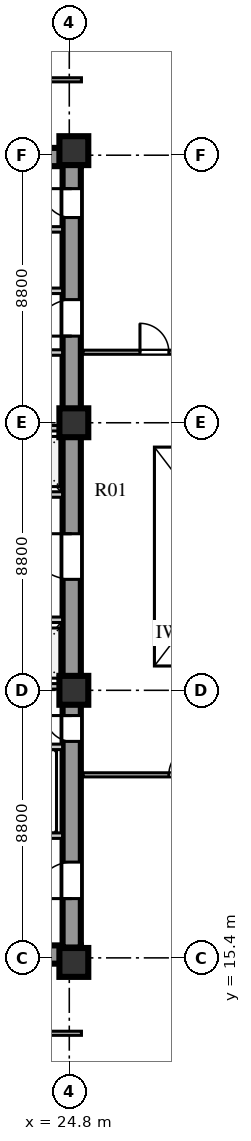
"""IFC4 building model, lengths in metres.
Left out: names, types, materials, properties, quantities, classifications, styles, units other than length and angle.
Written with IfcOpenShell. Run it as: python <this file> out.ifc"""

import sys

from ifc_helpers import new_model, si_unit, direction, frame, frame_2d, origin, origin_2d, place, context, subcontext, project, spatial, rectangle, extrude, element, fill, save


model = new_model("IFC4")
c1 = context("Model", 3, precision=1e-05, world=origin(), true_north=direction((0.0, 1.0)))
c2 = subcontext(c1, "Body", "Model", "MODEL_VIEW")
j1 = project(units=[si_unit("LENGTHUNIT", "METRE"), si_unit("PLANEANGLEUNIT", "RADIAN")], contexts=[c1])
p1 = place(None, origin())
s1 = spatial("IfcSite", under=j1, at=p1, CompositionType="ELEMENT")
p2 = place(p1, origin())
s2 = spatial("IfcBuilding", under=s1, at=p2, CompositionType="ELEMENT")
p3 = place(p2, frame((0.0, 0.0, 42.0)))
s3 = spatial("IfcBuildingStorey", under=s2, at=p3, CompositionType="ELEMENT", Elevation=42.0)
for number, where, z_axis, x_axis in (
    (1, (15.3, 15.51, 0.0), (0.0, 0.0, 1.0), (1.0, 0.0, 0.0)),
    (2, (15.3, 41.74, 0.0), (0.0, 0.0, 1.0), (1.0, 0.0, 0.0)),
):
    element("IfcWall", number, at=place(p3, frame(where, z_axis=z_axis, x_axis=x_axis)), inside=s3, PredefinedType="SHEAR", context=c2, shape_type="SweptSolid", body=[
        extrude(rectangle(XDim=9.88, YDim=0.6, at=frame_2d((4.94, 0.0))), origin(), (0.0, 0.0, 1.0), 3.72),
    ])
p4 = place(p3, frame((24.88, 15.74, 0.0), z_axis=(0.0, 0.0, 1.0), x_axis=(0.0, 1.0, 0.0)))
e3 = element("IfcWall", 3, at=p4, inside=s3, PredefinedType="SHEAR", context=c2, shape_type="SweptSolid", body=[
    extrude(rectangle(XDim=25.76, YDim=0.6, at=frame_2d((12.88, 0.0))), origin(), (0.0, 0.0, 1.0), 3.72),
])
p5 = place(p4, frame((1.61, 0.0, 0.0)))
e4 = element("IfcOpeningElement", 4, at=p5, cuts=e3, PredefinedType="OPENING", context=c2, shape_type="SweptSolid", body=[
    extrude(rectangle(XDim=1.2, YDim=2.1, at=frame_2d((0.6, 1.05))), frame((0.0, 0.31, 0.0), z_axis=(0.0, -1.0, 0.0), x_axis=(1.0, 0.0, 0.0)), (0.0, 0.0, 1.0), 0.62),
])
p6 = place(p4, frame((6.78, 0.0, 0.0)))
e5 = element("IfcOpeningElement", 5, at=p6, cuts=e3, PredefinedType="OPENING", context=c2, shape_type="SweptSolid", body=[
    extrude(rectangle(XDim=0.85, YDim=2.06, at=frame_2d((0.425, 1.03))), frame((0.0, 0.31, 0.0), z_axis=(0.0, -1.0, 0.0), x_axis=(1.0, 0.0, 0.0)), (0.0, 0.0, 1.0), 0.62),
])
p7 = place(p4, frame((12.11, 0.0, 0.0)))
e6 = element("IfcOpeningElement", 6, at=p7, cuts=e3, PredefinedType="OPENING", context=c2, shape_type="SweptSolid", body=[
    extrude(rectangle(XDim=1.5, YDim=2.12, at=frame_2d((0.75, 1.06))), frame((0.0, 0.31, 0.0), z_axis=(0.0, -1.0, 0.0), x_axis=(1.0, 0.0, 0.0)), (0.0, 0.0, 1.0), 0.62),
])
p8 = place(p4, frame((20.11, 0.0, 0.0)))
e7 = element("IfcOpeningElement", 7, at=p8, cuts=e3, PredefinedType="OPENING", context=c2, shape_type="SweptSolid", body=[
    extrude(rectangle(XDim=1.2, YDim=2.12, at=frame_2d((0.6, 1.06))), frame((0.0, 0.31, 0.0), z_axis=(0.0, -1.0, 0.0), x_axis=(1.0, 0.0, 0.0)), (0.0, 0.0, 1.0), 0.62),
])
p9 = place(p4, frame((24.01, 0.0, 0.0)))
e8 = element("IfcOpeningElement", 8, at=p9, cuts=e3, PredefinedType="OPENING", context=c2, shape_type="SweptSolid", body=[
    extrude(rectangle(XDim=0.95, YDim=2.1, at=frame_2d((0.475, 1.05))), frame((0.0, 0.31, 0.0), z_axis=(0.0, -1.0, 0.0), x_axis=(1.0, 0.0, 0.0)), (0.0, 0.0, 1.0), 0.62),
])
for number, where, z_axis, x_axis in (
    (9, (24.95, 15.25, 0.0), (0.0, 0.0, 1.0), (1.0, 0.0, 0.0)),
    (10, (24.95, 24.2, 0.0), (0.0, 0.0, 1.0), (1.0, 0.0, 0.0)),
    (11, (24.95, 33.0, 0.0), (0.0, 0.0, 1.0), (1.0, 0.0, 0.0)),
    (12, (24.95, 41.95, 0.0), (0.0, 0.0, 1.0), (1.0, 0.0, 0.0)),
):
    element("IfcColumn", number, at=place(p3, frame(where, z_axis=z_axis, x_axis=x_axis)), inside=s3, PredefinedType="COLUMN", context=c2, shape_type="SweptSolid", body=[
        extrude(rectangle(XDim=0.95, YDim=0.95, at=origin_2d()), origin(), (0.0, 0.0, 1.0), 3.72),
    ])
p10 = place(p3, frame((19.64, 19.42, 0.0), z_axis=(0.0, 0.0, 1.0), x_axis=(1.0, 0.0, 0.0)))
e13 = element("IfcWall", 13, at=p10, inside=s3, PredefinedType="SOLIDWALL", context=c2, shape_type="SweptSolid", body=[
    extrude(rectangle(XDim=4.94, YDim=0.18, at=frame_2d((2.47, 0.0))), origin(), (0.0, 0.0, 1.0), 3.72),
])
p11 = place(p10, frame((0.72, 0.0, 0.0)))
e14 = element("IfcOpeningElement", 14, at=p11, cuts=e13, PredefinedType="OPENING", context=c2, shape_type="SweptSolid", body=[
    extrude(rectangle(XDim=1.1, YDim=2.1, at=frame_2d((0.55, 1.05))), frame((0.0, 0.1, 0.0), z_axis=(0.0, -1.0, 0.0), x_axis=(1.0, 0.0, 0.0)), (0.0, 0.0, 1.0), 0.2),
])
p12 = place(p10, frame((3.02, 0.0, 0.0)))
e15 = element("IfcOpeningElement", 15, at=p12, cuts=e13, PredefinedType="OPENING", context=c2, shape_type="SweptSolid", body=[
    extrude(rectangle(XDim=1.1, YDim=2.1, at=frame_2d((0.55, 1.05))), frame((0.0, 0.1, 0.0), z_axis=(0.0, -1.0, 0.0), x_axis=(1.0, 0.0, 0.0)), (0.0, 0.0, 1.0), 0.2),
])
p13 = place(p3, frame((19.64, 22.34, 0.0), z_axis=(0.0, 0.0, 1.0), x_axis=(1.0, 0.0, 0.0)))
e16 = element("IfcWall", 16, at=p13, inside=s3, PredefinedType="SOLIDWALL", context=c2, shape_type="SweptSolid", body=[
    extrude(rectangle(XDim=4.94, YDim=0.18, at=frame_2d((2.47, 0.0))), origin(), (0.0, 0.0, 1.0), 3.72),
])
p14 = place(p3, frame((15.9, 26.52, 0.0), z_axis=(0.0, 0.0, 1.0), x_axis=(1.0, 0.0, 0.0)))
e17 = element("IfcWall", 17, at=p14, inside=s3, PredefinedType="SOLIDWALL", context=c2, shape_type="SweptSolid", body=[
    extrude(rectangle(XDim=8.68, YDim=0.18, at=frame_2d((4.34, 0.0))), origin(), (0.0, 0.0, 1.0), 3.72),
])
p15 = place(p14, frame((1.76, 0.0, 0.0)))
e18 = element("IfcOpeningElement", 18, at=p15, cuts=e17, PredefinedType="OPENING", context=c2, shape_type="SweptSolid", body=[
    extrude(rectangle(XDim=1.0, YDim=2.1, at=frame_2d((0.5, 1.05))), frame((0.0, 0.1, 0.0), z_axis=(0.0, -1.0, 0.0), x_axis=(1.0, 0.0, 0.0)), (0.0, 0.0, 1.0), 0.2),
])
p16 = place(p14, frame((3.6, 0.0, 0.0)))
e19 = element("IfcOpeningElement", 19, at=p16, cuts=e17, PredefinedType="OPENING", context=c2, shape_type="SweptSolid", body=[
    extrude(rectangle(XDim=1.0, YDim=2.1, at=frame_2d((0.5, 1.05))), frame((0.0, 0.1, 0.0), z_axis=(0.0, -1.0, 0.0), x_axis=(1.0, 0.0, 0.0)), (0.0, 0.0, 1.0), 0.2),
])
p17 = place(p14, frame((5.44, 0.0, 0.0)))
e20 = element("IfcOpeningElement", 20, at=p17, cuts=e17, PredefinedType="OPENING", context=c2, shape_type="SweptSolid", body=[
    extrude(rectangle(XDim=1.0, YDim=2.1, at=frame_2d((0.5, 1.05))), frame((0.0, 0.1, 0.0), z_axis=(0.0, -1.0, 0.0), x_axis=(1.0, 0.0, 0.0)), (0.0, 0.0, 1.0), 0.2),
])
p18 = place(p14, frame((7.28, 0.0, 0.0)))
e21 = element("IfcOpeningElement", 21, at=p18, cuts=e17, PredefinedType="OPENING", context=c2, shape_type="SweptSolid", body=[
    extrude(rectangle(XDim=1.0, YDim=2.1, at=frame_2d((0.5, 1.05))), frame((0.0, 0.1, 0.0), z_axis=(0.0, -1.0, 0.0), x_axis=(1.0, 0.0, 0.0)), (0.0, 0.0, 1.0), 0.2),
])
p19 = place(p3, frame((15.9, 24.33, 0.0), z_axis=(0.0, 0.0, 1.0), x_axis=(1.0, 0.0, 0.0)))
e22 = element("IfcWall", 22, at=p19, inside=s3, PredefinedType="SOLIDWALL", context=c2, shape_type="SweptSolid", body=[
    extrude(rectangle(XDim=8.68, YDim=0.18, at=frame_2d((4.34, 0.0))), origin(), (0.0, 0.0, 1.0), 3.02),
])
p20 = place(p3, frame((15.9, 30.64, 0.0), z_axis=(0.0, 0.0, 1.0), x_axis=(1.0, 0.0, 0.0)))
e23 = element("IfcWall", 23, at=p20, inside=s3, PredefinedType="SOLIDWALL", context=c2, shape_type="SweptSolid", body=[
    extrude(rectangle(XDim=8.68, YDim=0.18, at=frame_2d((4.34, 0.0))), origin(), (0.0, 0.0, 1.0), 3.72),
])
p21 = place(p20, frame((1.76, 0.0, 0.0)))
e24 = element("IfcOpeningElement", 24, at=p21, cuts=e23, PredefinedType="OPENING", context=c2, shape_type="SweptSolid", body=[
    extrude(rectangle(XDim=1.0, YDim=2.1, at=frame_2d((0.5, 1.05))), frame((0.0, 0.1, 0.0), z_axis=(0.0, -1.0, 0.0), x_axis=(1.0, 0.0, 0.0)), (0.0, 0.0, 1.0), 0.2),
])
p22 = place(p20, frame((3.6, 0.0, 0.0)))
e25 = element("IfcOpeningElement", 25, at=p22, cuts=e23, PredefinedType="OPENING", context=c2, shape_type="SweptSolid", body=[
    extrude(rectangle(XDim=1.0, YDim=2.1, at=frame_2d((0.5, 1.05))), frame((0.0, 0.1, 0.0), z_axis=(0.0, -1.0, 0.0), x_axis=(1.0, 0.0, 0.0)), (0.0, 0.0, 1.0), 0.2),
])
p23 = place(p20, frame((5.44, 0.0, 0.0)))
e26 = element("IfcOpeningElement", 26, at=p23, cuts=e23, PredefinedType="OPENING", context=c2, shape_type="SweptSolid", body=[
    extrude(rectangle(XDim=1.0, YDim=2.1, at=frame_2d((0.5, 1.05))), frame((0.0, 0.1, 0.0), z_axis=(0.0, -1.0, 0.0), x_axis=(1.0, 0.0, 0.0)), (0.0, 0.0, 1.0), 0.2),
])
p24 = place(p20, frame((7.28, 0.0, 0.0)))
e27 = element("IfcOpeningElement", 27, at=p24, cuts=e23, PredefinedType="OPENING", context=c2, shape_type="SweptSolid", body=[
    extrude(rectangle(XDim=1.0, YDim=2.1, at=frame_2d((0.5, 1.05))), frame((0.0, 0.1, 0.0), z_axis=(0.0, -1.0, 0.0), x_axis=(1.0, 0.0, 0.0)), (0.0, 0.0, 1.0), 0.2),
])
p25 = place(p3, frame((15.9, 32.82, 0.0), z_axis=(0.0, 0.0, 1.0), x_axis=(1.0, 0.0, 0.0)))
e28 = element("IfcWall", 28, at=p25, inside=s3, PredefinedType="SOLIDWALL", context=c2, shape_type="SweptSolid", body=[
    extrude(rectangle(XDim=8.68, YDim=0.18, at=frame_2d((4.34, 0.0))), origin(), (0.0, 0.0, 1.0), 3.02),
])
p26 = place(p3, frame((22.02, 35.31, 0.0), z_axis=(0.0, 0.0, 1.0), x_axis=(1.0, 0.0, 0.0)))
e29 = element("IfcWall", 29, at=p26, inside=s3, PredefinedType="SOLIDWALL", context=c2, shape_type="SweptSolid", body=[
    extrude(rectangle(XDim=2.56, YDim=0.18, at=frame_2d((1.28, 0.0))), origin(), (0.0, 0.0, 1.0), 3.72),
])
p27 = place(p26, frame((0.55, 0.0, 0.0)))
e30 = element("IfcOpeningElement", 30, at=p27, cuts=e29, PredefinedType="OPENING", context=c2, shape_type="SweptSolid", body=[
    extrude(rectangle(XDim=1.0, YDim=2.1, at=frame_2d((0.5, 1.05))), frame((0.0, 0.1, 0.0), z_axis=(0.0, -1.0, 0.0), x_axis=(1.0, 0.0, 0.0)), (0.0, 0.0, 1.0), 0.2),
])
p28 = place(p3, frame((19.64, 37.34, 0.0), z_axis=(0.0, 0.0, 1.0), x_axis=(1.0, 0.0, 0.0)))
e31 = element("IfcWall", 31, at=p28, inside=s3, PredefinedType="SOLIDWALL", context=c2, shape_type="SweptSolid", body=[
    extrude(rectangle(XDim=4.94, YDim=0.18, at=frame_2d((2.47, 0.0))), origin(), (0.0, 0.0, 1.0), 3.72),
])
p29 = place(p28, frame((0.45, 0.0, 0.0)))
e32 = element("IfcOpeningElement", 32, at=p29, cuts=e31, PredefinedType="OPENING", context=c2, shape_type="SweptSolid", body=[
    extrude(rectangle(XDim=1.0, YDim=2.1, at=frame_2d((0.5, 1.05))), frame((0.0, 0.1, 0.0), z_axis=(0.0, -1.0, 0.0), x_axis=(1.0, 0.0, 0.0)), (0.0, 0.0, 1.0), 0.2),
])
p30 = place(p28, frame((2.5, 0.0, 0.0)))
e33 = element("IfcOpeningElement", 33, at=p30, cuts=e31, PredefinedType="OPENING", context=c2, shape_type="SweptSolid", body=[
    extrude(rectangle(XDim=1.0, YDim=2.1, at=frame_2d((0.5, 1.05))), frame((0.0, 0.1, 0.0), z_axis=(0.0, -1.0, 0.0), x_axis=(1.0, 0.0, 0.0)), (0.0, 0.0, 1.0), 0.2),
])
p31 = place(p3, frame((19.64, 39.36, 0.0), z_axis=(0.0, 0.0, 1.0), x_axis=(1.0, 0.0, 0.0)))
e34 = element("IfcWall", 34, at=p31, inside=s3, PredefinedType="SOLIDWALL", context=c2, shape_type="SweptSolid", body=[
    extrude(rectangle(XDim=4.94, YDim=0.18, at=frame_2d((2.47, 0.0))), origin(), (0.0, 0.0, 1.0), 3.72),
])
p32 = place(p3, frame((25.25, 21.42, 0.0), z_axis=(0.0, 0.0, 1.0), x_axis=(1.0, 0.0, 0.0)))
e35 = element("IfcWall", 35, at=p32, inside=s3, PredefinedType="PARTITIONING", context=c2, shape_type="SweptSolid", body=[
    extrude(rectangle(XDim=12.87, YDim=0.135, at=frame_2d((6.435, 0.0))), origin(), (0.0, 0.0, 1.0), 3.32),
])
p33 = place(p32, frame((2.825, 0.0, 0.0)))
e36 = element("IfcOpeningElement", 36, at=p33, cuts=e35, PredefinedType="OPENING", context=c2, shape_type="SweptSolid", body=[
    extrude(rectangle(XDim=0.95, YDim=2.08, at=frame_2d((0.475, 1.04))), frame((0.0, 0.078, 0.0), z_axis=(0.0, -1.0, 0.0), x_axis=(1.0, 0.0, 0.0)), (0.0, 0.0, 1.0), 0.155),
])
p34 = place(p32, frame((9.195, 0.0, 0.0)))
e37 = element("IfcOpeningElement", 37, at=p34, cuts=e35, PredefinedType="OPENING", context=c2, shape_type="SweptSolid", body=[
    extrude(rectangle(XDim=0.95, YDim=2.08, at=frame_2d((0.475, 1.04))), frame((0.0, 0.078, 0.0), z_axis=(0.0, -1.0, 0.0), x_axis=(1.0, 0.0, 0.0)), (0.0, 0.0, 1.0), 0.155),
])
p35 = place(p3, frame((25.25, 35.32, 0.0), z_axis=(0.0, 0.0, 1.0), x_axis=(1.0, 0.0, 0.0)))
e38 = element("IfcWall", 38, at=p35, inside=s3, PredefinedType="PARTITIONING", context=c2, shape_type="SweptSolid", body=[
    extrude(rectangle(XDim=9.47, YDim=0.135, at=frame_2d((4.735, 0.0))), origin(), (0.0, 0.0, 1.0), 3.72),
])
p36 = place(p35, frame((1.875, 0.0, 0.0)))
e39 = element("IfcOpeningElement", 39, at=p36, cuts=e38, PredefinedType="OPENING", context=c2, shape_type="SweptSolid", body=[
    extrude(rectangle(XDim=0.95, YDim=2.08, at=frame_2d((0.475, 1.04))), frame((0.0, 0.078, 0.0), z_axis=(0.0, -1.0, 0.0), x_axis=(1.0, 0.0, 0.0)), (0.0, 0.0, 1.0), 0.155),
])
p37 = place(p35, frame((6.565, 0.0, 0.0)))
e40 = element("IfcOpeningElement", 40, at=p37, cuts=e38, PredefinedType="OPENING", context=c2, shape_type="SweptSolid", body=[
    extrude(rectangle(XDim=0.95, YDim=2.08, at=frame_2d((0.475, 1.04))), frame((0.0, 0.078, 0.0), z_axis=(0.0, -1.0, 0.0), x_axis=(1.0, 0.0, 0.0)), (0.0, 0.0, 1.0), 0.155),
])
p38 = place(p3, frame((10.5, 12.92, 0.0), z_axis=(0.0, 0.0, 1.0), x_axis=(1.0, 0.0, 0.0)))
e41 = element("IfcWall", 41, at=p38, inside=s3, PredefinedType="PARTITIONING", context=c2, shape_type="SweptSolid", body=[
    extrude(rectangle(XDim=14.7, YDim=0.135, at=frame_2d((7.35, 0.0))), origin(), (0.0, 0.0, 1.0), 3.72),
])
p39 = place(p38, frame((6.2, 0.0, 0.0)))
e42 = element("IfcOpeningElement", 42, at=p39, cuts=e41, PredefinedType="OPENING", context=c2, shape_type="SweptSolid", body=[
    extrude(rectangle(XDim=1.0, YDim=2.08, at=frame_2d((0.5, 1.04))), frame((0.0, 0.078, 0.0), z_axis=(0.0, -1.0, 0.0), x_axis=(1.0, 0.0, 0.0)), (0.0, 0.0, 1.0), 0.155),
])
p40 = place(p3, frame((10.5, 44.28, 0.0), z_axis=(0.0, 0.0, 1.0), x_axis=(1.0, 0.0, 0.0)))
e43 = element("IfcWall", 43, at=p40, inside=s3, PredefinedType="PARTITIONING", context=c2, shape_type="SweptSolid", body=[
    extrude(rectangle(XDim=14.7, YDim=0.135, at=frame_2d((7.35, 0.0))), origin(), (0.0, 0.0, 1.0), 3.72),
])
p41 = place(p40, frame((6.2, 0.0, 0.0)))
e44 = element("IfcOpeningElement", 44, at=p41, cuts=e43, PredefinedType="OPENING", context=c2, shape_type="SweptSolid", body=[
    extrude(rectangle(XDim=1.0, YDim=2.08, at=frame_2d((0.5, 1.04))), frame((0.0, 0.078, 0.0), z_axis=(0.0, -1.0, 0.0), x_axis=(1.0, 0.0, 0.0)), (0.0, 0.0, 1.0), 0.155),
])
p42 = place(p5, frame((1.2, 0.0, 0.0), z_axis=(0.0, 0.0, 1.0), x_axis=(-1.0, 0.0, 0.0)))
e45 = element("IfcDoor", 45, at=p42, inside=s3, OperationType="SINGLE_SWING_RIGHT", PredefinedType="DOOR", context=c2, shape_type="SweptSolid", body=[
    extrude(rectangle(XDim=1.2, YDim=2.1, at=frame_2d((0.6, 1.05))), frame((0.0, 0.025, 0.0), z_axis=(0.0, -1.0, 0.0), x_axis=(1.0, 0.0, 0.0)), (0.0, 0.0, 1.0), 0.05),
])
fill(e4, e45)
p43 = place(p6, frame((0.85, 0.0, 0.0), z_axis=(0.0, 0.0, 1.0), x_axis=(-1.0, 0.0, 0.0)))
e46 = element("IfcDoor", 46, at=p43, inside=s3, OperationType="SINGLE_SWING_LEFT", PredefinedType="DOOR", context=c2, shape_type="SweptSolid", body=[
    extrude(rectangle(XDim=0.85, YDim=2.06, at=frame_2d((0.425, 1.03))), frame((0.0, 0.025, 0.0), z_axis=(0.0, -1.0, 0.0), x_axis=(1.0, 0.0, 0.0)), (0.0, 0.0, 1.0), 0.05),
])
fill(e5, e46)
p44 = place(p7, frame((1.5, 0.0, 0.0), z_axis=(0.0, 0.0, 1.0), x_axis=(-1.0, 0.0, 0.0)))
e47 = element("IfcDoor", 47, at=p44, inside=s3, OperationType="SINGLE_SWING_LEFT", PredefinedType="DOOR", context=c2, shape_type="SweptSolid", body=[
    extrude(rectangle(XDim=1.5, YDim=2.12, at=frame_2d((0.75, 1.06))), frame((0.0, 0.025, 0.0), z_axis=(0.0, -1.0, 0.0), x_axis=(1.0, 0.0, 0.0)), (0.0, 0.0, 1.0), 0.05),
])
fill(e6, e47)
p45 = place(p8, frame((1.2, 0.0, 0.0), z_axis=(0.0, 0.0, 1.0), x_axis=(-1.0, 0.0, 0.0)))
e48 = element("IfcDoor", 48, at=p45, inside=s3, OperationType="SINGLE_SWING_RIGHT", PredefinedType="DOOR", context=c2, shape_type="SweptSolid", body=[
    extrude(rectangle(XDim=1.2, YDim=2.12, at=frame_2d((0.6, 1.06))), frame((0.0, 0.025, 0.0), z_axis=(0.0, -1.0, 0.0), x_axis=(1.0, 0.0, 0.0)), (0.0, 0.0, 1.0), 0.05),
])
fill(e7, e48)
p46 = place(p9, frame((0.95, 0.0, 0.0), z_axis=(0.0, 0.0, 1.0), x_axis=(-1.0, 0.0, 0.0)))
e49 = element("IfcDoor", 49, at=p46, inside=s3, OperationType="SINGLE_SWING_LEFT", PredefinedType="DOOR", context=c2, shape_type="SweptSolid", body=[
    extrude(rectangle(XDim=0.95, YDim=2.1, at=frame_2d((0.475, 1.05))), frame((0.0, 0.025, 0.0), z_axis=(0.0, -1.0, 0.0), x_axis=(1.0, 0.0, 0.0)), (0.0, 0.0, 1.0), 0.05),
])
fill(e8, e49)
p47 = place(p33, frame((0.95, 0.0, 0.0), z_axis=(0.0, 0.0, 1.0), x_axis=(-1.0, 0.0, 0.0)))
e50 = element("IfcDoor", 50, at=p47, inside=s3, OperationType="SINGLE_SWING_LEFT", PredefinedType="DOOR", context=c2, shape_type="SweptSolid", body=[
    extrude(rectangle(XDim=0.95, YDim=2.08, at=frame_2d((0.475, 1.04))), frame((0.0, 0.025, 0.0), z_axis=(0.0, -1.0, 0.0), x_axis=(1.0, 0.0, 0.0)), (0.0, 0.0, 1.0), 0.05),
])
fill(e36, e50)
p48 = place(p36, origin())
e51 = element("IfcDoor", 51, at=p48, inside=s3, OperationType="SINGLE_SWING_LEFT", PredefinedType="DOOR", context=c2, shape_type="SweptSolid", body=[
    extrude(rectangle(XDim=0.95, YDim=2.08, at=frame_2d((0.475, 1.04))), frame((0.0, 0.025, 0.0), z_axis=(0.0, -1.0, 0.0), x_axis=(1.0, 0.0, 0.0)), (0.0, 0.0, 1.0), 0.05),
])
fill(e39, e51)
save(model, sys.argv[1])
